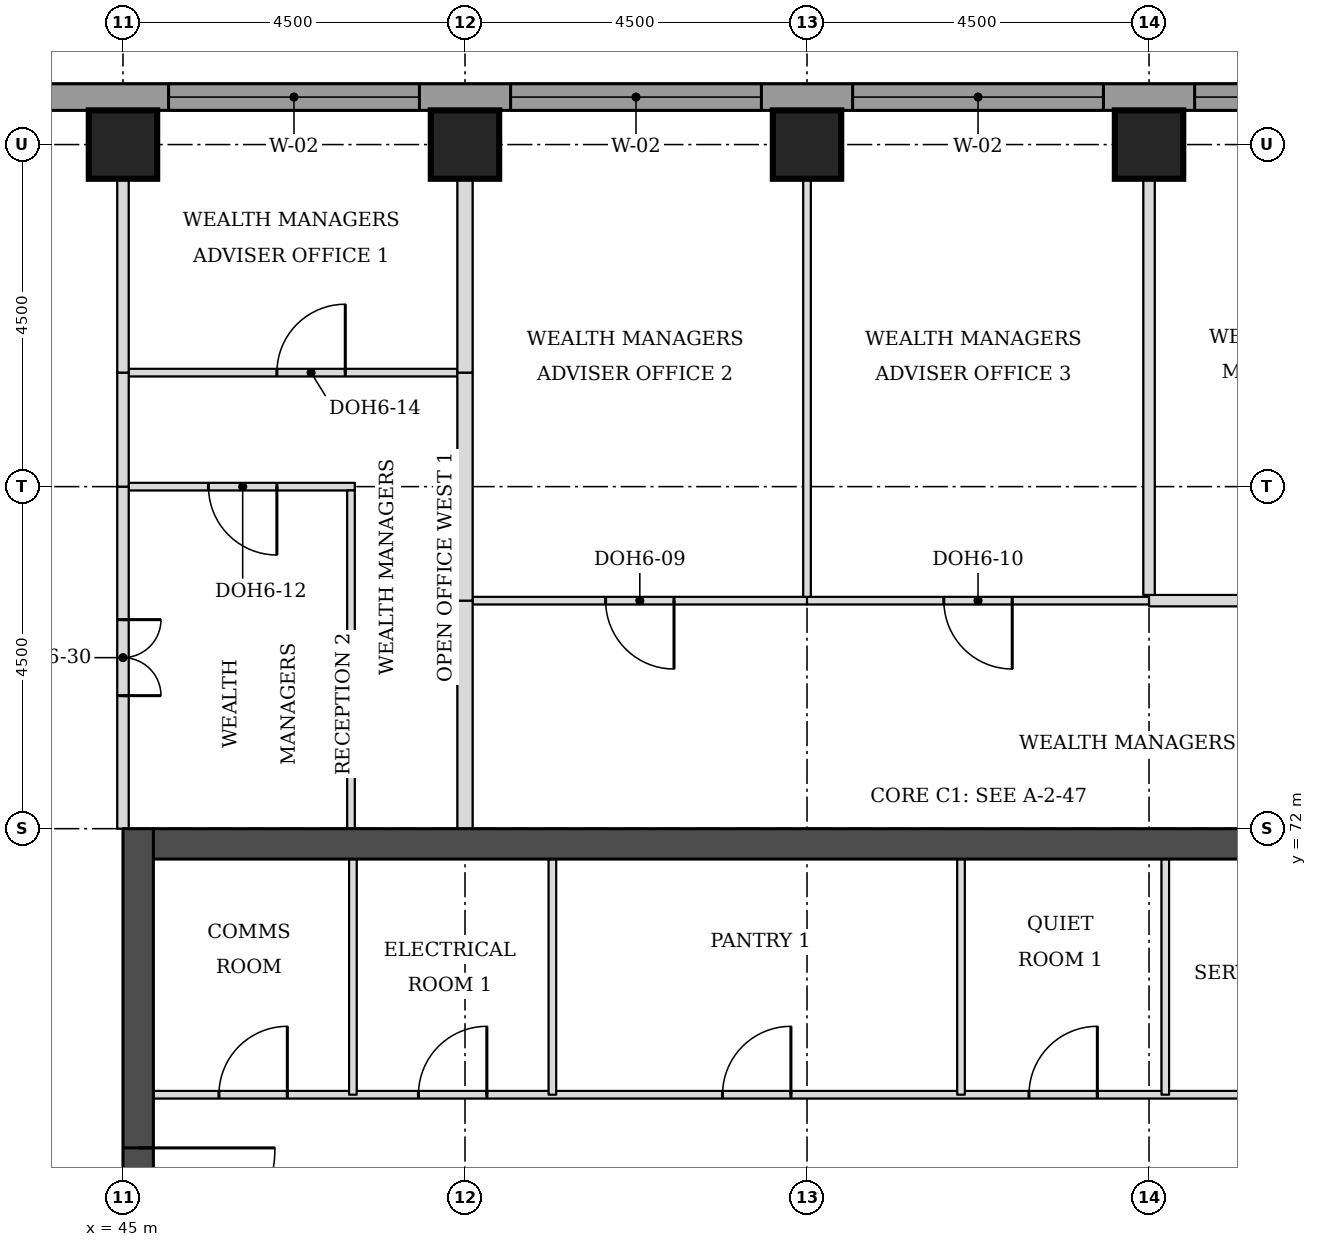
"""IFC4 building model, lengths in metres.
Left out: names, types, materials, properties, quantities, classifications, styles, units other than length and angle.
Written with IfcOpenShell. Run it as: python <this file> out.ifc"""

import sys

from ifc_helpers import new_model, si_unit, direction, frame, frame_2d, origin, origin_2d, place, context, subcontext, project, spatial, rectangle, extrude, element, fill, save


model = new_model("IFC4")
c1 = context("Model", 3, precision=1e-05, world=origin(), true_north=direction((0.0, 1.0)))
c2 = subcontext(c1, "Body", "Model", "MODEL_VIEW")
j1 = project(units=[si_unit("LENGTHUNIT", "METRE"), si_unit("PLANEANGLEUNIT", "RADIAN")], contexts=[c1])
p1 = place(None, origin())
s1 = spatial("IfcSite", under=j1, at=p1, CompositionType="ELEMENT")
p2 = place(p1, origin())
s2 = spatial("IfcBuilding", under=s1, at=p2, CompositionType="ELEMENT")
p3 = place(p2, frame((0.0, 0.0, 188.4)))
s3 = spatial("IfcBuildingStorey", under=s2, at=p3, CompositionType="ELEMENT", Elevation=188.4)
for number, where, z_axis, x_axis in (
    (1, (45.0, 81.0, 0.0), (0.0, 0.0, 1.0), (1.0, 0.0, 0.0)),
    (2, (49.5, 81.0, 0.0), (0.0, 0.0, 1.0), (1.0, 0.0, 0.0)),
    (3, (54.0, 81.0, 0.0), (0.0, 0.0, 1.0), (1.0, 0.0, 0.0)),
    (4, (58.5, 81.0, 0.0), (0.0, 0.0, 1.0), (1.0, 0.0, 0.0)),
):
    element("IfcColumn", number, at=place(p3, frame(where, z_axis=z_axis, x_axis=x_axis)), inside=s3, PredefinedType="COLUMN", context=c2, shape_type="SweptSolid", body=[
        extrude(rectangle(XDim=0.9, YDim=0.9, at=origin_2d()), origin(), (0.0, 0.0, 1.0), 3.7),
    ])
p4 = place(p3, frame((45.4, 71.8, 0.0), z_axis=(0.0, 0.0, 1.0), x_axis=(1.0, 0.0, 0.0)))
e5 = element("IfcWall", 5, at=p4, inside=s3, PredefinedType="SHEAR", context=c2, shape_type="SweptSolid", body=[
    extrude(rectangle(XDim=21.7, YDim=0.4, at=frame_2d((10.85, 0.0))), origin(), (0.0, 0.0, 1.0), 3.7),
])
p5 = place(p3, frame((45.2, 49.5, 0.0), z_axis=(0.0, 0.0, 1.0), x_axis=(0.0, 1.0, 0.0)))
e6 = element("IfcWall", 6, at=p5, inside=s3, PredefinedType="SHEAR", context=c2, shape_type="SweptSolid", body=[
    extrude(rectangle(XDim=22.5, YDim=0.4, at=frame_2d((11.25, 0.0))), origin(), (0.0, 0.0, 1.0), 3.7),
])
p6 = place(p5, frame((4.2, 0.0, 0.0)))
e7 = element("IfcOpeningElement", 7, at=p6, cuts=e6, PredefinedType="OPENING", context=c2, shape_type="SweptSolid", body=[
    extrude(rectangle(XDim=1.8, YDim=2.1, at=frame_2d((0.9, 1.05))), frame((0.0, 0.21, 0.0), z_axis=(0.0, -1.0, 0.0), x_axis=(1.0, 0.0, 0.0)), (0.0, 0.0, 1.0), 0.42),
])
p7 = place(p5, frame((6.9, 0.0, 0.0)))
e8 = element("IfcOpeningElement", 8, at=p7, cuts=e6, PredefinedType="OPENING", context=c2, shape_type="SweptSolid", body=[
    extrude(rectangle(XDim=1.1, YDim=2.1, at=frame_2d((0.55, 1.05))), frame((0.0, 0.21, 0.0), z_axis=(0.0, -1.0, 0.0), x_axis=(1.0, 0.0, 0.0)), (0.0, 0.0, 1.0), 0.42),
])
p8 = place(p5, frame((13.6, 0.0, 0.0)))
e9 = element("IfcOpeningElement", 9, at=p8, cuts=e6, PredefinedType="OPENING", context=c2, shape_type="SweptSolid", body=[
    extrude(rectangle(XDim=1.1, YDim=2.1, at=frame_2d((0.55, 1.05))), frame((0.0, 0.21, 0.0), z_axis=(0.0, -1.0, 0.0), x_axis=(1.0, 0.0, 0.0)), (0.0, 0.0, 1.0), 0.42),
])
p9 = place(p5, frame((16.5, 0.0, 0.0)))
e10 = element("IfcOpeningElement", 10, at=p9, cuts=e6, PredefinedType="OPENING", context=c2, shape_type="SweptSolid", body=[
    extrude(rectangle(XDim=1.8, YDim=2.1, at=frame_2d((0.9, 1.05))), frame((0.0, 0.21, 0.0), z_axis=(0.0, -1.0, 0.0), x_axis=(1.0, 0.0, 0.0)), (0.0, 0.0, 1.0), 0.42),
])
p10 = place(p3, frame((72.331, 81.625, 0.0), z_axis=(0.0, 0.0, 1.0), x_axis=(-1.0, 0.0, 0.0)))
e11 = element("IfcWall", 11, at=p10, inside=s3, PredefinedType="STANDARD", context=c2, shape_type="SweptSolid", body=[
    extrude(rectangle(XDim=32.163, YDim=0.35, at=frame_2d((16.081, 0.0))), origin(), (0.0, 0.0, 1.0), 3.525),
])
p11 = place(p10, frame((5.431, 0.0, 0.9)))
e12 = element("IfcOpeningElement", 12, at=p11, cuts=e11, PredefinedType="OPENING", context=c2, shape_type="SweptSolid", body=[
    extrude(rectangle(XDim=3.3, YDim=1.9, at=frame_2d((1.65, 0.95))), frame((0.0, 0.185, 0.0), z_axis=(0.0, -1.0, 0.0), x_axis=(1.0, 0.0, 0.0)), (0.0, 0.0, 1.0), 0.37),
])
p12 = place(p10, frame((9.931, 0.0, 0.9)))
e13 = element("IfcOpeningElement", 13, at=p12, cuts=e11, PredefinedType="OPENING", context=c2, shape_type="SweptSolid", body=[
    extrude(rectangle(XDim=3.3, YDim=1.9, at=frame_2d((1.65, 0.95))), frame((0.0, 0.185, 0.0), z_axis=(0.0, -1.0, 0.0), x_axis=(1.0, 0.0, 0.0)), (0.0, 0.0, 1.0), 0.37),
])
p13 = place(p10, frame((14.431, 0.0, 0.9)))
e14 = element("IfcOpeningElement", 14, at=p13, cuts=e11, PredefinedType="OPENING", context=c2, shape_type="SweptSolid", body=[
    extrude(rectangle(XDim=3.3, YDim=1.9, at=frame_2d((1.65, 0.95))), frame((0.0, 0.185, 0.0), z_axis=(0.0, -1.0, 0.0), x_axis=(1.0, 0.0, 0.0)), (0.0, 0.0, 1.0), 0.37),
])
p14 = place(p10, frame((18.931, 0.0, 0.9)))
e15 = element("IfcOpeningElement", 15, at=p14, cuts=e11, PredefinedType="OPENING", context=c2, shape_type="SweptSolid", body=[
    extrude(rectangle(XDim=3.3, YDim=1.9, at=frame_2d((1.65, 0.95))), frame((0.0, 0.185, 0.0), z_axis=(0.0, -1.0, 0.0), x_axis=(1.0, 0.0, 0.0)), (0.0, 0.0, 1.0), 0.37),
])
p15 = place(p10, frame((23.431, 0.0, 0.9)))
e16 = element("IfcOpeningElement", 16, at=p15, cuts=e11, PredefinedType="OPENING", context=c2, shape_type="SweptSolid", body=[
    extrude(rectangle(XDim=3.3, YDim=1.9, at=frame_2d((1.65, 0.95))), frame((0.0, 0.185, 0.0), z_axis=(0.0, -1.0, 0.0), x_axis=(1.0, 0.0, 0.0)), (0.0, 0.0, 1.0), 0.37),
])
p16 = place(p3, frame((49.6, 75.0, 0.0), z_axis=(0.0, 0.0, 1.0), x_axis=(1.0, 0.0, 0.0)))
e17 = element("IfcWall", 17, at=p16, inside=s3, PredefinedType="PARTITIONING", context=c2, shape_type="SweptSolid", body=[
    extrude(rectangle(XDim=4.4, YDim=0.1, at=frame_2d((2.2, 0.0))), origin(), (0.0, 0.0, 1.0), 3.55),
])
p17 = place(p16, frame((1.75, 0.0, 0.0)))
e18 = element("IfcOpeningElement", 18, at=p17, cuts=e17, PredefinedType="OPENING", context=c2, shape_type="SweptSolid", body=[
    extrude(rectangle(XDim=0.9, YDim=2.1, at=frame_2d((0.45, 1.05))), frame((0.0, 0.06, 0.0), z_axis=(0.0, -1.0, 0.0), x_axis=(1.0, 0.0, 0.0)), (0.0, 0.0, 1.0), 0.12),
])
p18 = place(p3, frame((54.0, 75.0, 0.0), z_axis=(0.0, 0.0, 1.0), x_axis=(1.0, 0.0, 0.0)))
e19 = element("IfcWall", 19, at=p18, inside=s3, PredefinedType="PARTITIONING", context=c2, shape_type="SweptSolid", body=[
    extrude(rectangle(XDim=4.5, YDim=0.1, at=frame_2d((2.25, 0.0))), origin(), (0.0, 0.0, 1.0), 3.55),
])
p19 = place(p18, frame((1.8, 0.0, 0.0)))
e20 = element("IfcOpeningElement", 20, at=p19, cuts=e19, PredefinedType="OPENING", context=c2, shape_type="SweptSolid", body=[
    extrude(rectangle(XDim=0.9, YDim=2.1, at=frame_2d((0.45, 1.05))), frame((0.0, 0.06, 0.0), z_axis=(0.0, -1.0, 0.0), x_axis=(1.0, 0.0, 0.0)), (0.0, 0.0, 1.0), 0.12),
])
p20 = place(p3, frame((58.5, 75.0, 0.0), z_axis=(0.0, 0.0, 1.0), x_axis=(1.0, 0.0, 0.0)))
e21 = element("IfcWall", 21, at=p20, inside=s3, PredefinedType="PARTITIONING", context=c2, shape_type="SweptSolid", body=[
    extrude(rectangle(XDim=4.575, YDim=0.15, at=frame_2d((2.288, 0.0))), origin(), (0.0, 0.0, 1.0), 3.55),
])
p21 = place(p20, frame((1.85, 0.0, 0.0)))
e22 = element("IfcOpeningElement", 22, at=p21, cuts=e21, PredefinedType="OPENING", context=c2, shape_type="SweptSolid", body=[
    extrude(rectangle(XDim=0.9, YDim=2.1, at=frame_2d((0.45, 1.05))), frame((0.0, 0.085, 0.0), z_axis=(0.0, -1.0, 0.0), x_axis=(1.0, 0.0, 0.0)), (0.0, 0.0, 1.0), 0.17),
])
p22 = place(p3, frame((45.075, 76.5, 0.0), z_axis=(0.0, 0.0, 1.0), x_axis=(1.0, 0.0, 0.0)))
e23 = element("IfcWall", 23, at=p22, inside=s3, PredefinedType="PARTITIONING", context=c2, shape_type="SweptSolid", body=[
    extrude(rectangle(XDim=2.975, YDim=0.1, at=frame_2d((1.488, 0.0))), origin(), (0.0, 0.0, 1.0), 3.55),
])
p23 = place(p22, frame((1.05, 0.0, 0.0)))
e24 = element("IfcOpeningElement", 24, at=p23, cuts=e23, PredefinedType="OPENING", context=c2, shape_type="SweptSolid", body=[
    extrude(rectangle(XDim=0.9, YDim=2.1, at=frame_2d((0.45, 1.05))), frame((0.0, 0.06, 0.0), z_axis=(0.0, -1.0, 0.0), x_axis=(1.0, 0.0, 0.0)), (0.0, 0.0, 1.0), 0.12),
])
p24 = place(p3, frame((45.075, 78.0, 0.0), z_axis=(0.0, 0.0, 1.0), x_axis=(1.0, 0.0, 0.0)))
e25 = element("IfcWall", 25, at=p24, inside=s3, PredefinedType="PARTITIONING", context=c2, shape_type="SweptSolid", body=[
    extrude(rectangle(XDim=4.325, YDim=0.1, at=frame_2d((2.163, 0.0))), origin(), (0.0, 0.0, 1.0), 3.55),
])
p25 = place(p24, frame((1.95, 0.0, 0.0)))
e26 = element("IfcOpeningElement", 26, at=p25, cuts=e25, PredefinedType="OPENING", context=c2, shape_type="SweptSolid", body=[
    extrude(rectangle(XDim=0.9, YDim=2.1, at=frame_2d((0.45, 1.05))), frame((0.0, 0.06, 0.0), z_axis=(0.0, -1.0, 0.0), x_axis=(1.0, 0.0, 0.0)), (0.0, 0.0, 1.0), 0.12),
])
p26 = place(p3, frame((45.0, 72.0, 0.0), z_axis=(0.0, 0.0, 1.0), x_axis=(0.0, 1.0, 0.0)))
e27 = element("IfcWall", 27, at=p26, inside=s3, PredefinedType="PARTITIONING", context=c2, shape_type="SweptSolid", body=[
    extrude(rectangle(XDim=4.5, YDim=0.15, at=frame_2d((2.25, 0.0))), origin(), (0.0, 0.0, 1.0), 3.022),
])
p27 = place(p26, frame((1.75, 0.0, 0.0)))
e28 = element("IfcOpeningElement", 28, at=p27, cuts=e27, PredefinedType="OPENING", context=c2, shape_type="SweptSolid", body=[
    extrude(rectangle(XDim=1.0, YDim=2.1, at=frame_2d((0.5, 1.05))), frame((0.0, 0.085, 0.0), z_axis=(0.0, -1.0, 0.0), x_axis=(1.0, 0.0, 0.0)), (0.0, 0.0, 1.0), 0.17),
])
p28 = place(p3, frame((48.0, 72.0, 0.0), z_axis=(0.0, 0.0, 1.0), x_axis=(0.0, 1.0, 0.0)))
e29 = element("IfcWall", 29, at=p28, inside=s3, PredefinedType="PARTITIONING", context=c2, shape_type="SweptSolid", body=[
    extrude(rectangle(XDim=4.45, YDim=0.1, at=frame_2d((2.225, 0.0))), origin(), (0.0, 0.0, 1.0), 3.55),
])
for number, where, z_axis, x_axis in (
    (30, (49.5, 72.0, 0.0), (0.0, 0.0, 1.0), (0.0, 1.0, 0.0)),
    (31, (49.5, 75.0, 0.0), (0.0, 0.0, 1.0), (0.0, 1.0, 0.0)),
):
    element("IfcWall", number, at=place(p3, frame(where, z_axis=z_axis, x_axis=x_axis)), inside=s3, PredefinedType="PARTITIONING", context=c2, shape_type="SweptSolid", body=[
        extrude(rectangle(XDim=3.0, YDim=0.2, at=frame_2d((1.5, 0.0))), origin(), (0.0, 0.0, 1.0), 3.55),
    ])
p29 = place(p3, frame((54.0, 75.05, 0.0), z_axis=(0.0, 0.0, 1.0), x_axis=(0.0, 1.0, 0.0)))
e32 = element("IfcWall", 32, at=p29, inside=s3, PredefinedType="PARTITIONING", context=c2, shape_type="SweptSolid", body=[
    extrude(rectangle(XDim=6.4, YDim=0.1, at=frame_2d((3.2, 0.0))), origin(), (0.0, 0.0, 1.0), 3.55),
])
p30 = place(p3, frame((58.5, 75.075, 0.0), z_axis=(0.0, 0.0, 1.0), x_axis=(0.0, 1.0, 0.0)))
e33 = element("IfcWall", 33, at=p30, inside=s3, PredefinedType="PARTITIONING", context=c2, shape_type="SweptSolid", body=[
    extrude(rectangle(XDim=6.375, YDim=0.15, at=frame_2d((3.188, 0.0))), origin(), (0.0, 0.0, 1.0), 3.55),
])
p31 = place(p3, frame((45.0, 76.5, 0.0), z_axis=(0.0, 0.0, 1.0), x_axis=(0.0, 1.0, 0.0)))
e34 = element("IfcWall", 34, at=p31, inside=s3, PredefinedType="PARTITIONING", context=c2, shape_type="SweptSolid", body=[
    extrude(rectangle(XDim=1.5, YDim=0.15, at=frame_2d((0.75, 0.0))), origin(), (0.0, 0.0, 1.0), 3.022),
])
p32 = place(p3, frame((45.0, 78.0, 0.0), z_axis=(0.0, 0.0, 1.0), x_axis=(0.0, 1.0, 0.0)))
e35 = element("IfcWall", 35, at=p32, inside=s3, PredefinedType="PARTITIONING", context=c2, shape_type="SweptSolid", body=[
    extrude(rectangle(XDim=3.45, YDim=0.15, at=frame_2d((1.725, 0.0))), origin(), (0.0, 0.0, 1.0), 3.022),
])
p33 = place(p3, frame((49.5, 78.0, 0.0), z_axis=(0.0, 0.0, 1.0), x_axis=(0.0, 1.0, 0.0)))
e36 = element("IfcWall", 36, at=p33, inside=s3, PredefinedType="PARTITIONING", context=c2, shape_type="SweptSolid", body=[
    extrude(rectangle(XDim=3.45, YDim=0.2, at=frame_2d((1.725, 0.0))), origin(), (0.0, 0.0, 1.0), 3.55),
])
p34 = place(p3, frame((45.4, 68.5, 0.0), z_axis=(0.0, 0.0, 1.0), x_axis=(1.0, 0.0, 0.0)))
e37 = element("IfcWall", 37, at=p34, inside=s3, PredefinedType="PARTITIONING", context=c2, shape_type="SweptSolid", body=[
    extrude(rectangle(XDim=21.7, YDim=0.1, at=frame_2d((10.85, 0.0))), origin(), (0.0, 0.0, 1.0), 3.55),
])
p35 = place(p34, frame((18.625, 0.0, 0.0)))
e38 = element("IfcOpeningElement", 38, at=p35, cuts=e37, PredefinedType="OPENING", context=c2, shape_type="SweptSolid", body=[
    extrude(rectangle(XDim=0.9, YDim=2.1, at=frame_2d((0.45, 1.05))), frame((0.0, 0.06, 0.0), z_axis=(0.0, -1.0, 0.0), x_axis=(1.0, 0.0, 0.0)), (0.0, 0.0, 1.0), 0.12),
])
p36 = place(p34, frame((0.863, 0.0, 0.0)))
e39 = element("IfcOpeningElement", 39, at=p36, cuts=e37, PredefinedType="OPENING", context=c2, shape_type="SweptSolid", body=[
    extrude(rectangle(XDim=0.9, YDim=2.1, at=frame_2d((0.45, 1.05))), frame((0.0, 0.06, 0.0), z_axis=(0.0, -1.0, 0.0), x_axis=(1.0, 0.0, 0.0)), (0.0, 0.0, 1.0), 0.12),
])
p37 = place(p34, frame((3.488, 0.0, 0.0)))
e40 = element("IfcOpeningElement", 40, at=p37, cuts=e37, PredefinedType="OPENING", context=c2, shape_type="SweptSolid", body=[
    extrude(rectangle(XDim=0.9, YDim=2.1, at=frame_2d((0.45, 1.05))), frame((0.0, 0.06, 0.0), z_axis=(0.0, -1.0, 0.0), x_axis=(1.0, 0.0, 0.0)), (0.0, 0.0, 1.0), 0.12),
])
p38 = place(p34, frame((14.432, 0.0, 0.0)))
e41 = element("IfcOpeningElement", 41, at=p38, cuts=e37, PredefinedType="OPENING", context=c2, shape_type="SweptSolid", body=[
    extrude(rectangle(XDim=0.9, YDim=2.1, at=frame_2d((0.45, 1.05))), frame((0.0, 0.06, 0.0), z_axis=(0.0, -1.0, 0.0), x_axis=(1.0, 0.0, 0.0)), (0.0, 0.0, 1.0), 0.12),
])
p39 = place(p34, frame((11.52, 0.0, 0.0)))
e42 = element("IfcOpeningElement", 42, at=p39, cuts=e37, PredefinedType="OPENING", context=c2, shape_type="SweptSolid", body=[
    extrude(rectangle(XDim=0.9, YDim=2.1, at=frame_2d((0.45, 1.05))), frame((0.0, 0.06, 0.0), z_axis=(0.0, -1.0, 0.0), x_axis=(1.0, 0.0, 0.0)), (0.0, 0.0, 1.0), 0.12),
])
p40 = place(p34, frame((7.488, 0.0, 0.0)))
e43 = element("IfcOpeningElement", 43, at=p40, cuts=e37, PredefinedType="OPENING", context=c2, shape_type="SweptSolid", body=[
    extrude(rectangle(XDim=0.9, YDim=2.1, at=frame_2d((0.45, 1.05))), frame((0.0, 0.06, 0.0), z_axis=(0.0, -1.0, 0.0), x_axis=(1.0, 0.0, 0.0)), (0.0, 0.0, 1.0), 0.12),
])
for number, where, z_axis, x_axis in (
    (44, (48.025, 68.5, 0.0), (0.0, 0.0, 1.0), (0.0, 1.0, 0.0)),
    (45, (50.65, 68.5, 0.0), (0.0, 0.0, 1.0), (0.0, 1.0, 0.0)),
    (46, (56.026, 68.5, 0.0), (0.0, 0.0, 1.0), (0.0, 1.0, 0.0)),
    (47, (58.714, 68.5, 0.0), (0.0, 0.0, 1.0), (0.0, 1.0, 0.0)),
):
    element("IfcWall", number, at=place(p3, frame(where, z_axis=z_axis, x_axis=x_axis)), inside=s3, PredefinedType="PARTITIONING", context=c2, shape_type="SweptSolid", body=[
        extrude(rectangle(XDim=3.1, YDim=0.1, at=frame_2d((1.55, 0.0))), origin(), (0.0, 0.0, 1.0), 3.55),
    ])
p41 = place(p12, origin())
e48 = element("IfcWindow", 48, at=p41, inside=s3, PartitioningType="SINGLE_PANEL", PredefinedType="WINDOW", context=c2, shape_type="SweptSolid", body=[
    extrude(rectangle(XDim=3.3, YDim=1.9, at=frame_2d((1.65, 0.95))), frame((0.0, 0.085, 0.0), z_axis=(0.0, -1.0, 0.0), x_axis=(1.0, 0.0, 0.0)), (0.0, 0.0, 1.0), 0.06),
])
fill(e13, e48)
p42 = place(p13, origin())
e49 = element("IfcWindow", 49, at=p42, inside=s3, PartitioningType="SINGLE_PANEL", PredefinedType="WINDOW", context=c2, shape_type="SweptSolid", body=[
    extrude(rectangle(XDim=3.3, YDim=1.9, at=frame_2d((1.65, 0.95))), frame((0.0, 0.085, 0.0), z_axis=(0.0, -1.0, 0.0), x_axis=(1.0, 0.0, 0.0)), (0.0, 0.0, 1.0), 0.06),
])
fill(e14, e49)
p43 = place(p14, origin())
e50 = element("IfcWindow", 50, at=p43, inside=s3, PartitioningType="SINGLE_PANEL", PredefinedType="WINDOW", context=c2, shape_type="SweptSolid", body=[
    extrude(rectangle(XDim=3.3, YDim=1.9, at=frame_2d((1.65, 0.95))), frame((0.0, 0.085, 0.0), z_axis=(0.0, -1.0, 0.0), x_axis=(1.0, 0.0, 0.0)), (0.0, 0.0, 1.0), 0.06),
])
fill(e15, e50)
p44 = place(p15, origin())
e51 = element("IfcWindow", 51, at=p44, inside=s3, PartitioningType="SINGLE_PANEL", PredefinedType="WINDOW", context=c2, shape_type="SweptSolid", body=[
    extrude(rectangle(XDim=3.3, YDim=1.9, at=frame_2d((1.65, 0.95))), frame((0.0, 0.085, 0.0), z_axis=(0.0, -1.0, 0.0), x_axis=(1.0, 0.0, 0.0)), (0.0, 0.0, 1.0), 0.06),
])
fill(e16, e51)
p45 = place(p27, frame((1.0, 0.0, 0.0), z_axis=(0.0, 0.0, 1.0), x_axis=(-1.0, 0.0, 0.0)))
e52 = element("IfcDoor", 52, at=p45, inside=s3, OperationType="DOUBLE_DOOR_SINGLE_SWING", PredefinedType="DOOR", context=c2, shape_type="SweptSolid", body=[
    extrude(rectangle(XDim=1.0, YDim=2.1, at=frame_2d((0.5, 1.05))), frame((0.0, 0.025, 0.0), z_axis=(0.0, -1.0, 0.0), x_axis=(1.0, 0.0, 0.0)), (0.0, 0.0, 1.0), 0.05),
])
fill(e28, e52)
p46 = place(p23, frame((0.9, 0.0, 0.0), z_axis=(0.0, 0.0, 1.0), x_axis=(-1.0, 0.0, 0.0)))
e53 = element("IfcDoor", 53, at=p46, inside=s3, OperationType="SINGLE_SWING_LEFT", PredefinedType="DOOR", context=c2, shape_type="SweptSolid", body=[
    extrude(rectangle(XDim=0.9, YDim=2.1, at=frame_2d((0.45, 1.05))), frame((0.0, 0.025, 0.0), z_axis=(0.0, -1.0, 0.0), x_axis=(1.0, 0.0, 0.0)), (0.0, 0.0, 1.0), 0.05),
])
fill(e24, e53)
p47 = place(p25, origin())
e54 = element("IfcDoor", 54, at=p47, inside=s3, OperationType="SINGLE_SWING_RIGHT", PredefinedType="DOOR", context=c2, shape_type="SweptSolid", body=[
    extrude(rectangle(XDim=0.9, YDim=2.1, at=frame_2d((0.45, 1.05))), frame((0.0, 0.025, 0.0), z_axis=(0.0, -1.0, 0.0), x_axis=(1.0, 0.0, 0.0)), (0.0, 0.0, 1.0), 0.05),
])
fill(e26, e54)
p48 = place(p17, frame((0.9, 0.0, 0.0), z_axis=(0.0, 0.0, 1.0), x_axis=(-1.0, 0.0, 0.0)))
e55 = element("IfcDoor", 55, at=p48, inside=s3, OperationType="SINGLE_SWING_LEFT", PredefinedType="DOOR", context=c2, shape_type="SweptSolid", body=[
    extrude(rectangle(XDim=0.9, YDim=2.1, at=frame_2d((0.45, 1.05))), frame((0.0, 0.025, 0.0), z_axis=(0.0, -1.0, 0.0), x_axis=(1.0, 0.0, 0.0)), (0.0, 0.0, 1.0), 0.05),
])
fill(e18, e55)
p49 = place(p19, frame((0.9, 0.0, 0.0), z_axis=(0.0, 0.0, 1.0), x_axis=(-1.0, 0.0, 0.0)))
e56 = element("IfcDoor", 56, at=p49, inside=s3, OperationType="SINGLE_SWING_LEFT", PredefinedType="DOOR", context=c2, shape_type="SweptSolid", body=[
    extrude(rectangle(XDim=0.9, YDim=2.1, at=frame_2d((0.45, 1.05))), frame((0.0, 0.025, 0.0), z_axis=(0.0, -1.0, 0.0), x_axis=(1.0, 0.0, 0.0)), (0.0, 0.0, 1.0), 0.05),
])
fill(e20, e56)
p50 = place(p9, frame((1.8, 0.0, 0.0), z_axis=(0.0, 0.0, 1.0), x_axis=(-1.0, 0.0, 0.0)))
e57 = element("IfcDoor", 57, at=p50, inside=s3, OperationType="SINGLE_SWING_LEFT", PredefinedType="DOOR", context=c2, shape_type="SweptSolid", body=[
    extrude(rectangle(XDim=1.8, YDim=2.1, at=frame_2d((0.9, 1.05))), frame((0.0, 0.025, 0.0), z_axis=(0.0, -1.0, 0.0), x_axis=(1.0, 0.0, 0.0)), (0.0, 0.0, 1.0), 0.05),
])
fill(e10, e57)
p51 = place(p36, origin())
e58 = element("IfcDoor", 58, at=p51, inside=s3, OperationType="SINGLE_SWING_RIGHT", PredefinedType="DOOR", context=c2, shape_type="SweptSolid", body=[
    extrude(rectangle(XDim=0.9, YDim=2.1, at=frame_2d((0.45, 1.05))), frame((0.0, 0.025, 0.0), z_axis=(0.0, -1.0, 0.0), x_axis=(1.0, 0.0, 0.0)), (0.0, 0.0, 1.0), 0.05),
])
fill(e39, e58)
p52 = place(p37, origin())
e59 = element("IfcDoor", 59, at=p52, inside=s3, OperationType="SINGLE_SWING_RIGHT", PredefinedType="DOOR", context=c2, shape_type="SweptSolid", body=[
    extrude(rectangle(XDim=0.9, YDim=2.1, at=frame_2d((0.45, 1.05))), frame((0.0, 0.025, 0.0), z_axis=(0.0, -1.0, 0.0), x_axis=(1.0, 0.0, 0.0)), (0.0, 0.0, 1.0), 0.05),
])
fill(e40, e59)
p53 = place(p39, origin())
e60 = element("IfcDoor", 60, at=p53, inside=s3, OperationType="SINGLE_SWING_RIGHT", PredefinedType="DOOR", context=c2, shape_type="SweptSolid", body=[
    extrude(rectangle(XDim=0.9, YDim=2.1, at=frame_2d((0.45, 1.05))), frame((0.0, 0.025, 0.0), z_axis=(0.0, -1.0, 0.0), x_axis=(1.0, 0.0, 0.0)), (0.0, 0.0, 1.0), 0.05),
])
fill(e42, e60)
p54 = place(p40, origin())
e61 = element("IfcDoor", 61, at=p54, inside=s3, OperationType="SINGLE_SWING_RIGHT", PredefinedType="DOOR", context=c2, shape_type="SweptSolid", body=[
    extrude(rectangle(XDim=0.9, YDim=2.1, at=frame_2d((0.45, 1.05))), frame((0.0, 0.025, 0.0), z_axis=(0.0, -1.0, 0.0), x_axis=(1.0, 0.0, 0.0)), (0.0, 0.0, 1.0), 0.05),
])
fill(e43, e61)
save(model, sys.argv[1])
